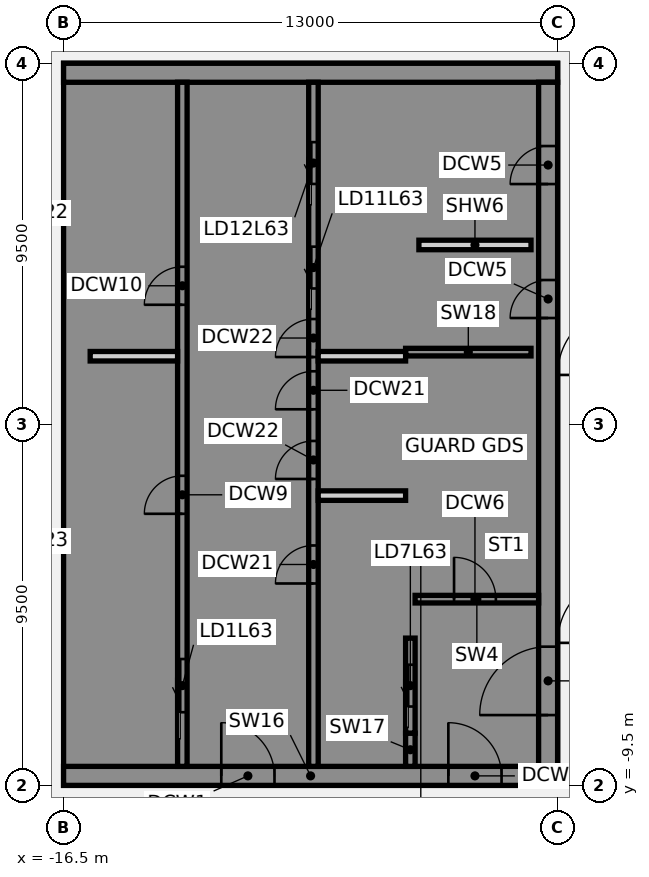
"""IFC4 building model, lengths in metres.
Left out: names, types, materials, properties, quantities, classifications, styles, units other than length and angle.
Written with IfcOpenShell. Run it as: python <this file> out.ifc"""

import sys

from ifc_helpers import new_model, si_unit, direction, frame, frame_2d, origin, place, context, subcontext, project, spatial, polyline, rectangle, outline, extrude, element, fill, save


model = new_model("IFC4")
c1 = context("Model", 3, precision=1e-05, world=origin(), true_north=direction((0.0, 1.0)))
c2 = subcontext(c1, "Body", "Model", "MODEL_VIEW")
j1 = project(units=[si_unit("LENGTHUNIT", "METRE"), si_unit("PLANEANGLEUNIT", "RADIAN")], contexts=[c1])
p1 = place(None, origin())
s1 = spatial("IfcSite", under=j1, at=p1, CompositionType="ELEMENT")
p2 = place(p1, origin())
s2 = spatial("IfcBuilding", under=s1, at=p2, CompositionType="ELEMENT")
p3 = place(p2, frame((0.0, 0.0, 248.7)))
s3 = spatial("IfcBuildingStorey", under=s2, at=p3, CompositionType="ELEMENT", Elevation=248.7)
p4 = place(p3, frame((-16.5, -9.25, 0.0), z_axis=(0.0, 0.0, 1.0), x_axis=(1.0, 0.0, 0.0)))
e1 = element("IfcWall", 1, at=p4, inside=s3, PredefinedType="SHEAR", context=c2, shape_type="SweptSolid", body=[
    extrude(rectangle(XDim=13.0, YDim=0.5, at=frame_2d((6.5, 0.0))), origin(), (0.0, 0.0, 1.0), 3.42),
])
p5 = place(p4, frame((4.15, 0.0, 0.0)))
e2 = element("IfcOpeningElement", 2, at=p5, cuts=e1, PredefinedType="OPENING", context=c2, shape_type="SweptSolid", body=[
    extrude(rectangle(XDim=1.4, YDim=2.1, at=frame_2d((0.7, 1.05))), frame((0.0, 0.26, 0.0), z_axis=(0.0, -1.0, 0.0), x_axis=(1.0, 0.0, 0.0)), (0.0, 0.0, 1.0), 0.52),
])
p6 = place(p4, frame((10.125, 0.0, 0.0)))
e3 = element("IfcOpeningElement", 3, at=p6, cuts=e1, PredefinedType="OPENING", context=c2, shape_type="SweptSolid", body=[
    extrude(rectangle(XDim=1.4, YDim=2.1, at=frame_2d((0.7, 1.05))), frame((0.0, 0.26, 0.0), z_axis=(0.0, -1.0, 0.0), x_axis=(1.0, 0.0, 0.0)), (0.0, 0.0, 1.0), 0.52),
])
p7 = place(p3, origin())
e4 = element("IfcWall", 4, at=p7, inside=s3, PredefinedType="SHEAR", context=c2, shape_type="SweptSolid", body=[
    extrude(outline(polyline([(-13.5, -8.125), (-16.0, -8.125), (-16.0, -5.625), (-13.5, -5.625), (-13.5, -5.375), (-16.0, -5.375), (-16.0, 5.375), (-13.5, 5.375), (-13.5, 5.625), (-16.0, 5.625), (-16.0, 8.125), (-13.5, 8.125), (-13.5, 9.0), (-16.0, 9.0), (-16.5, 9.0), (-16.5, -9.0), (-16.0, -9.0), (-13.5, -9.0), (-13.5, -8.125)])), origin(), (0.0, 0.0, 1.0), 3.42),
])
p8 = place(p3, frame((-16.5, 9.25, 0.0), z_axis=(0.0, 0.0, 1.0), x_axis=(1.0, 0.0, 0.0)))
e5 = element("IfcWall", 5, at=p8, inside=s3, PredefinedType="SHEAR", context=c2, shape_type="SweptSolid", body=[
    extrude(rectangle(XDim=13.0, YDim=0.5, at=frame_2d((6.5, 0.0))), origin(), (0.0, 0.0, 1.0), 3.42),
])
p9 = place(p3, origin())
e6 = element("IfcWall", 6, at=p9, inside=s3, PredefinedType="SHEAR", context=c2, shape_type="SweptSolid", body=[
    extrude(outline(polyline([(-9.8, -5.375), (-9.8, -5.625), (-7.5, -5.625), (-7.25, -5.625), (-7.25, 9.0), (-7.5, 9.0), (-9.8, 9.0), (-9.8, 8.125), (-7.5, 8.125), (-7.5, 5.625), (-9.8, 5.625), (-9.8, 5.375), (-7.5, 5.375), (-7.5, 2.875), (-9.8, 2.875), (-9.8, 2.625), (-7.5, 2.625), (-7.5, -5.375), (-9.8, -5.375)])), origin(), (0.0, 0.0, 1.0), 3.42),
])
p10 = place(p3, origin())
e7 = element("IfcWall", 7, at=p10, inside=s3, PredefinedType="SHEAR", context=c2, shape_type="SweptSolid", body=[
    extrude(outline(polyline([(-7.5, -8.125), (-9.55, -8.125), (-9.55, -5.625), (-9.8, -5.625), (-9.8, -8.125), (-9.8, -9.0), (-7.5, -9.0), (-7.5, -8.125)])), origin(), (0.0, 0.0, 1.0), 3.42),
])
p11 = place(p3, frame((-7.375, -9.0, 0.0), z_axis=(0.0, 0.0, 1.0), x_axis=(0.0, 1.0, 0.0)))
e8 = element("IfcWall", 8, at=p11, inside=s3, PredefinedType="SHEAR", context=c2, shape_type="SweptSolid", body=[
    extrude(rectangle(XDim=0.875, YDim=0.25, at=frame_2d((0.438, 0.0))), origin(), (0.0, 0.0, 1.0), 3.42),
])
p12 = place(p3, frame((-7.5, 1.9, 0.0), z_axis=(0.0, 0.0, 1.0), x_axis=(1.0, 0.0, 0.0)))
e9 = element("IfcWall", 9, at=p12, inside=s3, PredefinedType="SHEAR", context=c2, shape_type="SweptSolid", body=[
    extrude(rectangle(XDim=3.3, YDim=0.2, at=frame_2d((1.65, 0.0))), origin(), (0.0, 0.0, 1.0), 3.42),
])
p13 = place(p3, frame((-13.375, -9.0, 0.0), z_axis=(0.0, 0.0, 1.0), x_axis=(0.0, 1.0, 0.0)))
e10 = element("IfcWall", 10, at=p13, inside=s3, PredefinedType="SHEAR", context=c2, shape_type="SweptSolid", body=[
    extrude(rectangle(XDim=18.0, YDim=0.25, at=frame_2d((9.0, 0.0))), origin(), (0.0, 0.0, 1.0), 3.42),
])
p14 = place(p13, frame((1.425, 0.0, 0.0)))
e11 = element("IfcOpeningElement", 11, at=p14, cuts=e10, PredefinedType="OPENING", context=c2, shape_type="SweptSolid", body=[
    extrude(rectangle(XDim=1.4, YDim=2.1, at=frame_2d((0.7, 1.05))), frame((0.0, 0.135, 0.0), z_axis=(0.0, -1.0, 0.0), x_axis=(1.0, 0.0, 0.0)), (0.0, 0.0, 1.0), 0.27),
])
p15 = place(p13, frame((6.646, 0.0, 0.0)))
e12 = element("IfcOpeningElement", 12, at=p15, cuts=e10, PredefinedType="OPENING", context=c2, shape_type="SweptSolid", body=[
    extrude(rectangle(XDim=1.0, YDim=2.1, at=frame_2d((0.5, 1.05))), frame((0.0, 0.135, 0.0), z_axis=(0.0, -1.0, 0.0), x_axis=(1.0, 0.0, 0.0)), (0.0, 0.0, 1.0), 0.27),
])
p16 = place(p13, frame((12.146, 0.0, 0.0)))
e13 = element("IfcOpeningElement", 13, at=p16, cuts=e10, PredefinedType="OPENING", context=c2, shape_type="SweptSolid", body=[
    extrude(rectangle(XDim=1.0, YDim=2.1, at=frame_2d((0.5, 1.05))), frame((0.0, 0.135, 0.0), z_axis=(0.0, -1.0, 0.0), x_axis=(1.0, 0.0, 0.0)), (0.0, 0.0, 1.0), 0.27),
])
p17 = place(p3, frame((-9.925, -9.0, 0.0), z_axis=(0.0, 0.0, 1.0), x_axis=(0.0, 1.0, 0.0)))
e14 = element("IfcWall", 14, at=p17, inside=s3, PredefinedType="SHEAR", context=c2, shape_type="SweptSolid", body=[
    extrude(rectangle(XDim=18.0, YDim=0.25, at=frame_2d((9.0, 0.0))), origin(), (0.0, 0.0, 1.0), 3.42),
])
p18 = place(p17, frame((12.575, 0.0, 0.0)))
e15 = element("IfcOpeningElement", 15, at=p18, cuts=e14, PredefinedType="OPENING", context=c2, shape_type="SweptSolid", body=[
    extrude(rectangle(XDim=1.1, YDim=2.1, at=frame_2d((0.55, 1.05))), frame((0.0, 0.135, 0.0), z_axis=(0.0, -1.0, 0.0), x_axis=(1.0, 0.0, 0.0)), (0.0, 0.0, 1.0), 0.27),
])
p19 = place(p17, frame((15.325, 0.0, 0.0)))
e16 = element("IfcOpeningElement", 16, at=p19, cuts=e14, PredefinedType="OPENING", context=c2, shape_type="SweptSolid", body=[
    extrude(rectangle(XDim=1.1, YDim=2.1, at=frame_2d((0.55, 1.05))), frame((0.0, 0.135, 0.0), z_axis=(0.0, -1.0, 0.0), x_axis=(1.0, 0.0, 0.0)), (0.0, 0.0, 1.0), 0.27),
])
p20 = place(p17, frame((4.812, 0.0, 0.0)))
e17 = element("IfcOpeningElement", 17, at=p20, cuts=e14, PredefinedType="OPENING", context=c2, shape_type="SweptSolid", body=[
    extrude(rectangle(XDim=1.0, YDim=2.1, at=frame_2d((0.5, 1.05))), frame((0.0, 0.135, 0.0), z_axis=(0.0, -1.0, 0.0), x_axis=(1.0, 0.0, 0.0)), (0.0, 0.0, 1.0), 0.27),
])
p21 = place(p17, frame((7.562, 0.0, 0.0)))
e18 = element("IfcOpeningElement", 18, at=p21, cuts=e14, PredefinedType="OPENING", context=c2, shape_type="SweptSolid", body=[
    extrude(rectangle(XDim=1.0, YDim=2.1, at=frame_2d((0.5, 1.05))), frame((0.0, 0.135, 0.0), z_axis=(0.0, -1.0, 0.0), x_axis=(1.0, 0.0, 0.0)), (0.0, 0.0, 1.0), 0.27),
])
p22 = place(p17, frame((9.396, 0.0, 0.0)))
e19 = element("IfcOpeningElement", 19, at=p22, cuts=e14, PredefinedType="OPENING", context=c2, shape_type="SweptSolid", body=[
    extrude(rectangle(XDim=1.0, YDim=2.1, at=frame_2d((0.5, 1.05))), frame((0.0, 0.135, 0.0), z_axis=(0.0, -1.0, 0.0), x_axis=(1.0, 0.0, 0.0)), (0.0, 0.0, 1.0), 0.27),
])
p23 = place(p17, frame((10.771, 0.0, 0.0)))
e20 = element("IfcOpeningElement", 20, at=p23, cuts=e14, PredefinedType="OPENING", context=c2, shape_type="SweptSolid", body=[
    extrude(rectangle(XDim=1.0, YDim=2.1, at=frame_2d((0.5, 1.05))), frame((0.0, 0.135, 0.0), z_axis=(0.0, -1.0, 0.0), x_axis=(1.0, 0.0, 0.0)), (0.0, 0.0, 1.0), 0.27),
])
p24 = place(p3, frame((-7.375, -8.125, 0.0), z_axis=(0.0, 0.0, 1.0), x_axis=(0.0, 1.0, 0.0)))
e21 = element("IfcWall", 21, at=p24, inside=s3, PredefinedType="SHEAR", context=c2, shape_type="SweptSolid", body=[
    extrude(rectangle(XDim=2.5, YDim=0.25, at=frame_2d((1.25, 0.0))), origin(), (0.0, 0.0, 1.0), 3.42),
])
p25 = place(p24, frame((0.7, 0.0, 0.0)))
e22 = element("IfcOpeningElement", 22, at=p25, cuts=e21, PredefinedType="OPENING", context=c2, shape_type="SweptSolid", body=[
    extrude(rectangle(XDim=1.1, YDim=2.1, at=frame_2d((0.55, 1.05))), frame((0.0, 0.135, 0.0), z_axis=(0.0, -1.0, 0.0), x_axis=(1.0, 0.0, 0.0)), (0.0, 0.0, 1.0), 0.27),
])
p26 = place(p3, frame((-3.75, -9.0, 0.0), z_axis=(0.0, 0.0, 1.0), x_axis=(0.0, 1.0, 0.0)))
e23 = element("IfcWall", 23, at=p26, inside=s3, PredefinedType="SHEAR", context=c2, shape_type="SweptSolid", body=[
    extrude(rectangle(XDim=18.0, YDim=0.5, at=frame_2d((9.0, 0.0))), origin(), (0.0, 0.0, 1.0), 3.42),
])
p27 = place(p26, frame((1.35, 0.0, 0.0)))
e24 = element("IfcOpeningElement", 24, at=p27, cuts=e23, PredefinedType="OPENING", context=c2, shape_type="SweptSolid", body=[
    extrude(rectangle(XDim=1.8, YDim=2.1, at=frame_2d((0.9, 1.05))), frame((0.0, 0.26, 0.0), z_axis=(0.0, -1.0, 0.0), x_axis=(1.0, 0.0, 0.0)), (0.0, 0.0, 1.0), 0.52),
])
p28 = place(p26, frame((11.798, 0.0, 0.0)))
e25 = element("IfcOpeningElement", 25, at=p28, cuts=e23, PredefinedType="OPENING", context=c2, shape_type="SweptSolid", body=[
    extrude(rectangle(XDim=1.0, YDim=2.1, at=frame_2d((0.5, 1.05))), frame((0.0, 0.26, 0.0), z_axis=(0.0, -1.0, 0.0), x_axis=(1.0, 0.0, 0.0)), (0.0, 0.0, 1.0), 0.52),
])
p29 = place(p26, frame((15.323, 0.0, 0.0)))
e26 = element("IfcOpeningElement", 26, at=p29, cuts=e23, PredefinedType="OPENING", context=c2, shape_type="SweptSolid", body=[
    extrude(rectangle(XDim=1.0, YDim=2.1, at=frame_2d((0.5, 1.05))), frame((0.0, 0.26, 0.0), z_axis=(0.0, -1.0, 0.0), x_axis=(1.0, 0.0, 0.0)), (0.0, 0.0, 1.0), 0.52),
])
p30 = place(p3, frame((-7.15, 4.72, 0.0), z_axis=(0.0, 0.0, 1.0), x_axis=(1.0, 0.0, 0.0)))
e27 = element("IfcWall", 27, at=p30, inside=s3, PredefinedType="PARTITIONING", context=c2, shape_type="SweptSolid", body=[
    extrude(rectangle(XDim=2.95, YDim=0.25, at=frame_2d((1.475, 0.0))), origin(), (0.0, 0.0, 1.0), 3.42),
])
p31 = place(p3, frame((-7.25, -4.6, 0.0), z_axis=(0.0, 0.0, 1.0), x_axis=(1.0, 0.0, 0.0)))
e28 = element("IfcWall", 28, at=p31, inside=s3, PredefinedType="SHEAR", context=c2, shape_type="SweptSolid", body=[
    extrude(rectangle(XDim=3.25, YDim=0.2, at=frame_2d((1.625, 0.0))), origin(), (0.0, 0.0, 1.0), 3.42),
])
p32 = place(p31, frame((1.025, 0.0, 0.0)))
e29 = element("IfcOpeningElement", 29, at=p32, cuts=e28, PredefinedType="OPENING", context=c2, shape_type="SweptSolid", body=[
    extrude(rectangle(XDim=1.1, YDim=2.1, at=frame_2d((0.55, 1.05))), frame((0.0, 0.11, 0.0), z_axis=(0.0, -1.0, 0.0), x_axis=(1.0, 0.0, 0.0)), (0.0, 0.0, 1.0), 0.22),
])
for number, where, z_axis, x_axis in (
    (30, (-15.8, 1.792, 0.0), (0.0, 0.0, 1.0), (1.0, 0.0, 0.0)),
    (31, (-9.8, -1.875, 0.0), (0.0, 0.0, 1.0), (1.0, 0.0, 0.0)),
    (32, (-9.8, 1.792, 0.0), (0.0, 0.0, 1.0), (1.0, 0.0, 0.0)),
):
    element("IfcWall", number, at=place(p3, frame(where, z_axis=z_axis, x_axis=x_axis)), inside=s3, PredefinedType="PARTITIONING", context=c2, shape_type="SweptSolid", body=[
        extrude(rectangle(XDim=2.3, YDim=0.25, at=frame_2d((1.15, 0.0))), origin(), (0.0, 0.0, 1.0), 3.42),
    ])
p33 = place(p5, origin())
e33 = element("IfcDoor", 33, at=p33, inside=s3, OperationType="SINGLE_SWING_LEFT", PredefinedType="DOOR", context=c2, shape_type="SweptSolid", body=[
    extrude(rectangle(XDim=1.4, YDim=2.1, at=frame_2d((0.7, 1.05))), frame((0.0, 0.025, 0.0), z_axis=(0.0, -1.0, 0.0), x_axis=(1.0, 0.0, 0.0)), (0.0, 0.0, 1.0), 0.05),
])
fill(e2, e33)
p34 = place(p6, origin())
e34 = element("IfcDoor", 34, at=p34, inside=s3, OperationType="SINGLE_SWING_LEFT", PredefinedType="DOOR", context=c2, shape_type="SweptSolid", body=[
    extrude(rectangle(XDim=1.4, YDim=2.1, at=frame_2d((0.7, 1.05))), frame((0.0, 0.025, 0.0), z_axis=(0.0, -1.0, 0.0), x_axis=(1.0, 0.0, 0.0)), (0.0, 0.0, 1.0), 0.05),
])
fill(e3, e34)
p35 = place(p27, origin())
e35 = element("IfcDoor", 35, at=p35, inside=s3, OperationType="SINGLE_SWING_LEFT", PredefinedType="DOOR", context=c2, shape_type="SweptSolid", body=[
    extrude(rectangle(XDim=1.8, YDim=2.1, at=frame_2d((0.9, 1.05))), frame((0.0, 0.025, 0.0), z_axis=(0.0, -1.0, 0.0), x_axis=(1.0, 0.0, 0.0)), (0.0, 0.0, 1.0), 0.05),
])
fill(e24, e35)
p36 = place(p28, origin())
e36 = element("IfcDoor", 36, at=p36, inside=s3, OperationType="SINGLE_SWING_LEFT", PredefinedType="DOOR", context=c2, shape_type="SweptSolid", body=[
    extrude(rectangle(XDim=1.0, YDim=2.1, at=frame_2d((0.5, 1.05))), frame((0.0, 0.225, 0.0), z_axis=(0.0, -1.0, 0.0), x_axis=(1.0, 0.0, 0.0)), (0.0, 0.0, 1.0), 0.05),
])
fill(e25, e36)
p37 = place(p29, origin())
e37 = element("IfcDoor", 37, at=p37, inside=s3, OperationType="SINGLE_SWING_LEFT", PredefinedType="DOOR", context=c2, shape_type="SweptSolid", body=[
    extrude(rectangle(XDim=1.0, YDim=2.1, at=frame_2d((0.5, 1.05))), frame((0.0, 0.225, 0.0), z_axis=(0.0, -1.0, 0.0), x_axis=(1.0, 0.0, 0.0)), (0.0, 0.0, 1.0), 0.05),
])
fill(e26, e37)
p38 = place(p32, origin())
e38 = element("IfcDoor", 38, at=p38, inside=s3, OperationType="SINGLE_SWING_LEFT", PredefinedType="DOOR", context=c2, shape_type="SweptSolid", body=[
    extrude(rectangle(XDim=1.1, YDim=2.1, at=frame_2d((0.55, 1.05))), frame((0.0, 0.025, 0.0), z_axis=(0.0, -1.0, 0.0), x_axis=(1.0, 0.0, 0.0)), (0.0, 0.0, 1.0), 0.05),
])
fill(e29, e38)
p39 = place(p14, origin())
e39 = element("IfcDoor", 39, at=p39, inside=s3, OperationType="SLIDING_TO_LEFT", PredefinedType="DOOR", context=c2, shape_type="SweptSolid", body=[
    extrude(rectangle(XDim=1.4, YDim=2.1, at=frame_2d((0.7, 1.05))), frame((0.0, 0.025, 0.0), z_axis=(0.0, -1.0, 0.0), x_axis=(1.0, 0.0, 0.0)), (0.0, 0.0, 1.0), 0.05),
])
fill(e11, e39)
p40 = place(p25, origin())
e40 = element("IfcDoor", 40, at=p40, inside=s3, OperationType="SLIDING_TO_LEFT", PredefinedType="DOOR", context=c2, shape_type="SweptSolid", body=[
    extrude(rectangle(XDim=1.1, YDim=2.1, at=frame_2d((0.55, 1.05))), frame((0.0, 0.025, 0.0), z_axis=(0.0, -1.0, 0.0), x_axis=(1.0, 0.0, 0.0)), (0.0, 0.0, 1.0), 0.05),
])
fill(e22, e40)
p41 = place(p18, origin())
e41 = element("IfcDoor", 41, at=p41, inside=s3, OperationType="SLIDING_TO_LEFT", PredefinedType="DOOR", context=c2, shape_type="SweptSolid", body=[
    extrude(rectangle(XDim=1.1, YDim=2.1, at=frame_2d((0.55, 1.05))), frame((0.0, 0.025, 0.0), z_axis=(0.0, -1.0, 0.0), x_axis=(1.0, 0.0, 0.0)), (0.0, 0.0, 1.0), 0.05),
])
fill(e15, e41)
p42 = place(p19, origin())
e42 = element("IfcDoor", 42, at=p42, inside=s3, OperationType="SLIDING_TO_LEFT", PredefinedType="DOOR", context=c2, shape_type="SweptSolid", body=[
    extrude(rectangle(XDim=1.1, YDim=2.1, at=frame_2d((0.55, 1.05))), frame((0.0, 0.025, 0.0), z_axis=(0.0, -1.0, 0.0), x_axis=(1.0, 0.0, 0.0)), (0.0, 0.0, 1.0), 0.05),
])
fill(e16, e42)
p43 = place(p15, origin())
e43 = element("IfcDoor", 43, at=p43, inside=s3, OperationType="SINGLE_SWING_LEFT", PredefinedType="DOOR", context=c2, shape_type="SweptSolid", body=[
    extrude(rectangle(XDim=1.0, YDim=2.1, at=frame_2d((0.5, 1.05))), frame((0.0, 0.025, 0.0), z_axis=(0.0, -1.0, 0.0), x_axis=(1.0, 0.0, 0.0)), (0.0, 0.0, 1.0), 0.05),
])
fill(e12, e43)
p44 = place(p16, origin())
e44 = element("IfcDoor", 44, at=p44, inside=s3, OperationType="SINGLE_SWING_LEFT", PredefinedType="DOOR", context=c2, shape_type="SweptSolid", body=[
    extrude(rectangle(XDim=1.0, YDim=2.1, at=frame_2d((0.5, 1.05))), frame((0.0, 0.025, 0.0), z_axis=(0.0, -1.0, 0.0), x_axis=(1.0, 0.0, 0.0)), (0.0, 0.0, 1.0), 0.05),
])
fill(e13, e44)
p45 = place(p20, origin())
e45 = element("IfcDoor", 45, at=p45, inside=s3, OperationType="SINGLE_SWING_LEFT", PredefinedType="DOOR", context=c2, shape_type="SweptSolid", body=[
    extrude(rectangle(XDim=1.0, YDim=2.1, at=frame_2d((0.5, 1.05))), frame((0.0, 0.025, 0.0), z_axis=(0.0, -1.0, 0.0), x_axis=(1.0, 0.0, 0.0)), (0.0, 0.0, 1.0), 0.05),
])
fill(e17, e45)
p46 = place(p21, origin())
e46 = element("IfcDoor", 46, at=p46, inside=s3, OperationType="SINGLE_SWING_LEFT", PredefinedType="DOOR", context=c2, shape_type="SweptSolid", body=[
    extrude(rectangle(XDim=1.0, YDim=2.1, at=frame_2d((0.5, 1.05))), frame((0.0, 0.025, 0.0), z_axis=(0.0, -1.0, 0.0), x_axis=(1.0, 0.0, 0.0)), (0.0, 0.0, 1.0), 0.05),
])
fill(e18, e46)
p47 = place(p22, origin())
e47 = element("IfcDoor", 47, at=p47, inside=s3, OperationType="SINGLE_SWING_LEFT", PredefinedType="DOOR", context=c2, shape_type="SweptSolid", body=[
    extrude(rectangle(XDim=1.0, YDim=2.1, at=frame_2d((0.5, 1.05))), frame((0.0, 0.025, 0.0), z_axis=(0.0, -1.0, 0.0), x_axis=(1.0, 0.0, 0.0)), (0.0, 0.0, 1.0), 0.05),
])
fill(e19, e47)
p48 = place(p23, origin())
e48 = element("IfcDoor", 48, at=p48, inside=s3, OperationType="SINGLE_SWING_LEFT", PredefinedType="DOOR", context=c2, shape_type="SweptSolid", body=[
    extrude(rectangle(XDim=1.0, YDim=2.1, at=frame_2d((0.5, 1.05))), frame((0.0, 0.025, 0.0), z_axis=(0.0, -1.0, 0.0), x_axis=(1.0, 0.0, 0.0)), (0.0, 0.0, 1.0), 0.05),
])
fill(e20, e48)
save(model, sys.argv[1])
